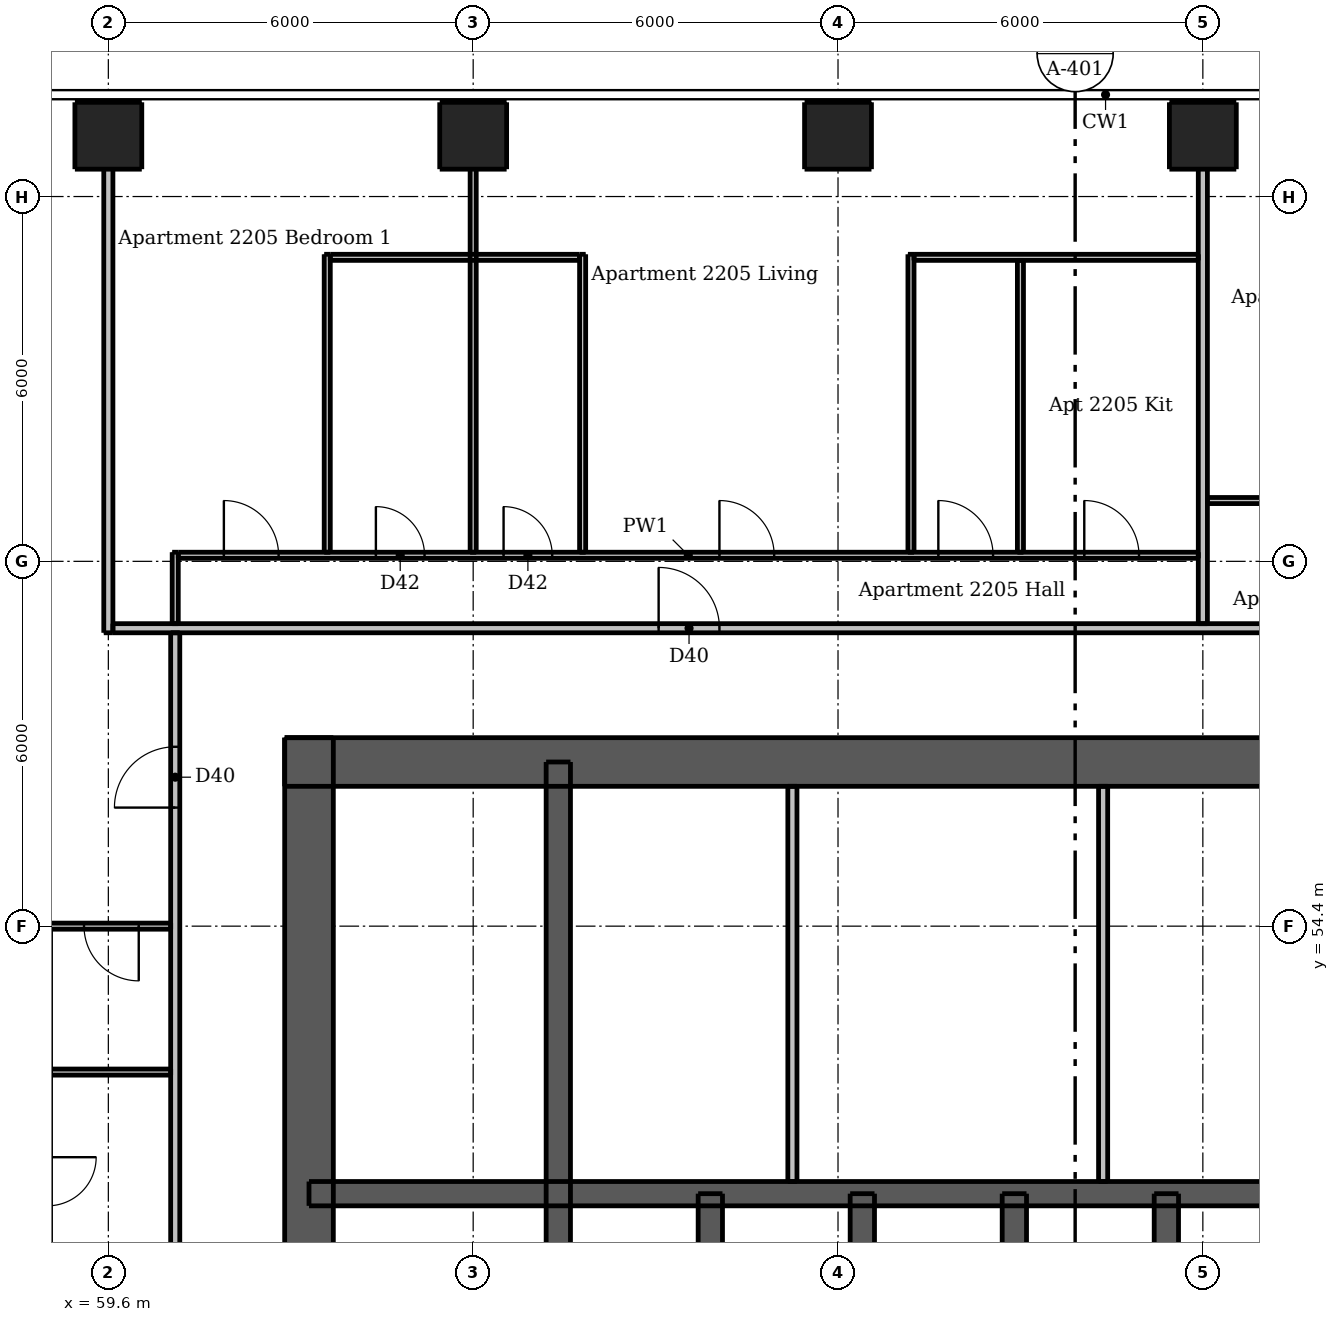
"""IFC4 building model, lengths in metres.
Left out: names, types, materials, properties, quantities, classifications, styles, units other than length and angle.
Written with IfcOpenShell. Run it as: python <this file> out.ifc"""

import sys

from ifc_helpers import new_model, si_unit, direction, frame, frame_2d, origin, origin_2d, place, context, subcontext, project, spatial, rectangle, extrude, element, fill, save


model = new_model("IFC4")
c1 = context("Model", 3, precision=1e-05, world=origin(), true_north=direction((0.0, 1.0)))
c2 = subcontext(c1, "Body", "Model", "MODEL_VIEW")
j1 = project(units=[si_unit("LENGTHUNIT", "METRE"), si_unit("PLANEANGLEUNIT", "RADIAN")], contexts=[c1])
p1 = place(None, origin())
s1 = spatial("IfcSite", under=j1, at=p1, CompositionType="ELEMENT")
p2 = place(p1, origin())
s2 = spatial("IfcBuilding", under=s1, at=p2, CompositionType="ELEMENT")
p3 = place(p2, frame((0.0, 0.0, 85.3)))
s3 = spatial("IfcBuildingStorey", under=s2, at=p3, CompositionType="ELEMENT", Elevation=85.3)
p4 = place(p3, frame((62.5, 57.1, 0.0), z_axis=(0.0, 0.0, 1.0), x_axis=(1.0, 0.0, 0.0)))
e1 = element("IfcWall", 1, at=p4, inside=s3, PredefinedType="SHEAR", context=c2, shape_type="SweptSolid", body=[
    extrude(rectangle(XDim=24.0, YDim=0.8, at=frame_2d((12.0, 0.0))), origin(), (0.0, 0.0, 1.0), 3.05),
])
p5 = place(p4, frame((20.9, 0.0, 0.0)))
e2 = element("IfcOpeningElement", 2, at=p5, cuts=e1, PredefinedType="OPENING", context=c2, shape_type="SweptSolid", body=[
    extrude(rectangle(XDim=1.1, YDim=2.1, at=frame_2d((0.55, 1.05))), frame((0.0, 0.41, 0.0), z_axis=(0.0, -1.0, 0.0), x_axis=(1.0, 0.0, 0.0)), (0.0, 0.0, 1.0), 0.82),
])
p6 = place(p4, frame((2.0, 0.0, 0.0)))
e3 = element("IfcOpeningElement", 3, at=p6, cuts=e1, PredefinedType="OPENING", context=c2, shape_type="SweptSolid", body=[
    extrude(rectangle(XDim=1.1, YDim=2.1, at=frame_2d((0.55, 1.05))), frame((0.0, 0.41, 0.0), z_axis=(0.0, -1.0, 0.0), x_axis=(1.0, 0.0, 0.0)), (0.0, 0.0, 1.0), 0.82),
])
p7 = place(p4, frame((6.075, 0.0, 0.0)))
e4 = element("IfcOpeningElement", 4, at=p7, cuts=e1, PredefinedType="OPENING", context=c2, shape_type="SweptSolid", body=[
    extrude(rectangle(XDim=0.9, YDim=2.1, at=frame_2d((0.45, 1.05))), frame((0.0, 0.41, 0.0), z_axis=(0.0, -1.0, 0.0), x_axis=(1.0, 0.0, 0.0)), (0.0, 0.0, 1.0), 0.82),
])
p8 = place(p4, frame((10.455, 0.0, 0.0)))
e5 = element("IfcOpeningElement", 5, at=p8, cuts=e1, PredefinedType="OPENING", context=c2, shape_type="SweptSolid", body=[
    extrude(rectangle(XDim=0.9, YDim=2.1, at=frame_2d((0.45, 1.05))), frame((0.0, 0.41, 0.0), z_axis=(0.0, -1.0, 0.0), x_axis=(1.0, 0.0, 0.0)), (0.0, 0.0, 1.0), 0.82),
])
p9 = place(p4, frame((15.93, 0.0, 0.0)))
e6 = element("IfcOpeningElement", 6, at=p9, cuts=e1, PredefinedType="OPENING", context=c2, shape_type="SweptSolid", body=[
    extrude(rectangle(XDim=0.9, YDim=2.1, at=frame_2d((0.45, 1.05))), frame((0.0, 0.41, 0.0), z_axis=(0.0, -1.0, 0.0), x_axis=(1.0, 0.0, 0.0)), (0.0, 0.0, 1.0), 0.82),
])
p10 = place(p3, frame((62.9, 33.5, 0.0), z_axis=(0.0, 0.0, 1.0), x_axis=(0.0, 1.0, 0.0)))
e7 = element("IfcWall", 7, at=p10, inside=s3, PredefinedType="SHEAR", context=c2, shape_type="SweptSolid", body=[
    extrude(rectangle(XDim=24.0, YDim=0.8, at=frame_2d((12.0, 0.0))), origin(), (0.0, 0.0, 1.0), 3.05),
])
p11 = place(p10, frame((11.2, 0.0, 0.0)))
e8 = element("IfcOpeningElement", 8, at=p11, cuts=e7, PredefinedType="OPENING", context=c2, shape_type="SweptSolid", body=[
    extrude(rectangle(XDim=1.6, YDim=2.1, at=frame_2d((0.8, 1.05))), frame((0.0, 0.41, 0.0), z_axis=(0.0, -1.0, 0.0), x_axis=(1.0, 0.0, 0.0)), (0.0, 0.0, 1.0), 0.82),
])
p12 = place(p3, frame((62.9, 50.0, 0.0), z_axis=(0.0, 0.0, 1.0), x_axis=(1.0, 0.0, 0.0)))
e9 = element("IfcWall", 9, at=p12, inside=s3, PredefinedType="SHEAR", context=c2, shape_type="SweptSolid", body=[
    extrude(rectangle(XDim=23.2, YDim=0.4, at=frame_2d((11.6, 0.0))), origin(), (0.0, 0.0, 1.0), 3.05),
])
p13 = place(p3, frame((67.0, 47.1, 0.0), z_axis=(0.0, 0.0, 1.0), x_axis=(0.0, 1.0, 0.0)))
e10 = element("IfcWall", 10, at=p13, inside=s3, PredefinedType="SHEAR", context=c2, shape_type="SweptSolid", body=[
    extrude(rectangle(XDim=10.0, YDim=0.4, at=frame_2d((5.0, 0.0))), origin(), (0.0, 0.0, 1.0), 3.05),
])
for number, where, z_axis, x_axis in (
    (11, (69.5, 47.1, 0.0), (0.0, 0.0, 1.0), (0.0, 1.0, 0.0)),
    (12, (72.0, 47.1, 0.0), (0.0, 0.0, 1.0), (0.0, 1.0, 0.0)),
    (13, (74.5, 47.1, 0.0), (0.0, 0.0, 1.0), (0.0, 1.0, 0.0)),
    (14, (77.0, 47.1, 0.0), (0.0, 0.0, 1.0), (0.0, 1.0, 0.0)),
):
    element("IfcWall", number, at=place(p3, frame(where, z_axis=z_axis, x_axis=x_axis)), inside=s3, PredefinedType="SHEAR", context=c2, shape_type="SweptSolid", body=[
        extrude(rectangle(XDim=2.9, YDim=0.4, at=frame_2d((1.45, 0.0))), origin(), (0.0, 0.0, 1.0), 3.05),
    ])
for number, where, z_axis, x_axis in (
    (15, (59.6, 67.4, 0.0), (0.0, 0.0, 1.0), (1.0, 0.0, 0.0)),
    (16, (65.6, 67.4, 0.0), (0.0, 0.0, 1.0), (1.0, 0.0, 0.0)),
    (17, (71.6, 67.4, 0.0), (0.0, 0.0, 1.0), (1.0, 0.0, 0.0)),
    (18, (77.6, 67.4, 0.0), (0.0, 0.0, 1.0), (1.0, 0.0, 0.0)),
):
    element("IfcColumn", number, at=place(p3, frame(where, z_axis=z_axis, x_axis=x_axis)), inside=s3, PredefinedType="COLUMN", context=c2, shape_type="SweptSolid", body=[
        extrude(rectangle(XDim=1.1, YDim=1.1, at=origin_2d()), origin(), (0.0, 0.0, 1.0), 3.05),
    ])
for number, where, z_axis, x_axis in (
    (19, (70.85, 50.2, 0.0), (0.0, 0.0, 1.0), (0.0, 1.0, 0.0)),
    (20, (75.96, 50.2, 0.0), (0.0, 0.0, 1.0), (0.0, 1.0, 0.0)),
):
    element("IfcWall", number, at=place(p3, frame(where, z_axis=z_axis, x_axis=x_axis)), inside=s3, PredefinedType="PLUMBINGWALL", context=c2, shape_type="SweptSolid", body=[
        extrude(rectangle(XDim=6.5, YDim=0.15, at=frame_2d((3.25, 0.0))), origin(), (0.0, 0.0, 1.0), 3.05),
    ])
p14 = place(p3, frame((60.7, 59.375, 0.0), z_axis=(0.0, 0.0, 1.0), x_axis=(0.0, 1.0, 0.0)))
e21 = element("IfcWall", 21, at=p14, inside=s3, PredefinedType="PARTITIONING", context=c2, shape_type="SweptSolid", body=[
    extrude(rectangle(XDim=1.175, YDim=0.1, at=frame_2d((0.587, 0.0))), origin(), (0.0, 0.0, 1.0), 3.05),
])
p15 = place(p3, frame((63.2, 60.55, 0.0), z_axis=(0.0, 0.0, 1.0), x_axis=(0.0, 1.0, 0.0)))
e22 = element("IfcWall", 22, at=p15, inside=s3, PredefinedType="PARTITIONING", context=c2, shape_type="SweptSolid", body=[
    extrude(rectangle(XDim=4.9, YDim=0.1, at=frame_2d((2.45, 0.0))), origin(), (0.0, 0.0, 1.0), 3.05),
])
p16 = place(p3, frame((65.6, 60.55, 0.0), z_axis=(0.0, 0.0, 1.0), x_axis=(0.0, 1.0, 0.0)))
e23 = element("IfcWall", 23, at=p16, inside=s3, PredefinedType="PARTITIONING", context=c2, shape_type="SweptSolid", body=[
    extrude(rectangle(XDim=7.45, YDim=0.1, at=frame_2d((3.725, 0.0))), origin(), (0.0, 0.0, 1.0), 2.516),
])
for number, where, z_axis, x_axis in (
    (24, (67.4, 60.55, 0.0), (0.0, 0.0, 1.0), (0.0, 1.0, 0.0)),
    (25, (72.8, 60.55, 0.0), (0.0, 0.0, 1.0), (0.0, 1.0, 0.0)),
):
    element("IfcWall", number, at=place(p3, frame(where, z_axis=z_axis, x_axis=x_axis)), inside=s3, PredefinedType="PARTITIONING", context=c2, shape_type="SweptSolid", body=[
        extrude(rectangle(XDim=4.9, YDim=0.1, at=frame_2d((2.45, 0.0))), origin(), (0.0, 0.0, 1.0), 3.05),
    ])
p17 = place(p3, frame((74.6, 60.55, 0.0), z_axis=(0.0, 0.0, 1.0), x_axis=(0.0, 1.0, 0.0)))
e26 = element("IfcWall", 26, at=p17, inside=s3, PredefinedType="PARTITIONING", context=c2, shape_type="SweptSolid", body=[
    extrude(rectangle(XDim=4.8, YDim=0.1, at=frame_2d((2.4, 0.0))), origin(), (0.0, 0.0, 1.0), 3.05),
])
p18 = place(p3, frame((63.25, 65.4, 0.0), z_axis=(0.0, 0.0, 1.0), x_axis=(1.0, 0.0, 0.0)))
e27 = element("IfcWall", 27, at=p18, inside=s3, PredefinedType="PARTITIONING", context=c2, shape_type="SweptSolid", body=[
    extrude(rectangle(XDim=4.1, YDim=0.1, at=frame_2d((2.05, 0.0))), origin(), (0.0, 0.0, 1.0), 3.05),
])
p19 = place(p3, frame((72.85, 65.4, 0.0), z_axis=(0.0, 0.0, 1.0), x_axis=(1.0, 0.0, 0.0)))
e28 = element("IfcWall", 28, at=p19, inside=s3, PredefinedType="PARTITIONING", context=c2, shape_type="SweptSolid", body=[
    extrude(rectangle(XDim=4.675, YDim=0.1, at=frame_2d((2.337, 0.0))), origin(), (0.0, 0.0, 1.0), 3.05),
])
p20 = place(p3, frame((83.55, 61.4, 0.0), z_axis=(0.0, 0.0, 1.0), x_axis=(-1.0, 0.0, 0.0)))
e29 = element("IfcWall", 29, at=p20, inside=s3, PredefinedType="PARTITIONING", context=c2, shape_type="SweptSolid", body=[
    extrude(rectangle(XDim=5.875, YDim=0.1, at=frame_2d((2.938, 0.0))), origin(), (0.0, 0.0, 1.0), 3.05),
])
p21 = place(p20, frame((3.75, 0.0, 0.0)))
e30 = element("IfcOpeningElement", 30, at=p21, cuts=e29, PredefinedType="OPENING", context=c2, shape_type="SweptSolid", body=[
    extrude(rectangle(XDim=0.8, YDim=2.1, at=frame_2d((0.4, 1.05))), frame((0.0, 0.06, 0.0), z_axis=(0.0, -1.0, 0.0), x_axis=(1.0, 0.0, 0.0)), (0.0, 0.0, 1.0), 0.12),
])
p22 = place(p3, frame((60.75, 60.5, 0.0), z_axis=(0.0, 0.0, 1.0), x_axis=(1.0, 0.0, 0.0)))
e31 = element("IfcWall", 31, at=p22, inside=s3, PredefinedType="PARTITIONING", context=c2, shape_type="SweptSolid", body=[
    extrude(rectangle(XDim=16.775, YDim=0.1, at=frame_2d((8.387, 0.0))), origin(), (0.0, 0.0, 1.0), 3.05),
])
p23 = place(p22, frame((8.9, 0.0, 0.0)))
e32 = element("IfcOpeningElement", 32, at=p23, cuts=e31, PredefinedType="OPENING", context=c2, shape_type="SweptSolid", body=[
    extrude(rectangle(XDim=0.9, YDim=2.1, at=frame_2d((0.45, 1.05))), frame((0.0, 0.06, 0.0), z_axis=(0.0, -1.0, 0.0), x_axis=(1.0, 0.0, 0.0)), (0.0, 0.0, 1.0), 0.12),
])
p24 = place(p22, frame((14.9, 0.0, 0.0)))
e33 = element("IfcOpeningElement", 33, at=p24, cuts=e31, PredefinedType="OPENING", context=c2, shape_type="SweptSolid", body=[
    extrude(rectangle(XDim=0.9, YDim=2.1, at=frame_2d((0.45, 1.05))), frame((0.0, 0.06, 0.0), z_axis=(0.0, -1.0, 0.0), x_axis=(1.0, 0.0, 0.0)), (0.0, 0.0, 1.0), 0.12),
])
p25 = place(p22, frame((12.5, 0.0, 0.0)))
e34 = element("IfcOpeningElement", 34, at=p25, cuts=e31, PredefinedType="OPENING", context=c2, shape_type="SweptSolid", body=[
    extrude(rectangle(XDim=0.9, YDim=2.1, at=frame_2d((0.45, 1.05))), frame((0.0, 0.06, 0.0), z_axis=(0.0, -1.0, 0.0), x_axis=(1.0, 0.0, 0.0)), (0.0, 0.0, 1.0), 0.12),
])
p26 = place(p22, frame((5.35, 0.0, 0.0)))
e35 = element("IfcOpeningElement", 35, at=p26, cuts=e31, PredefinedType="OPENING", context=c2, shape_type="SweptSolid", body=[
    extrude(rectangle(XDim=0.8, YDim=2.1, at=frame_2d((0.4, 1.05))), frame((0.0, 0.06, 0.0), z_axis=(0.0, -1.0, 0.0), x_axis=(1.0, 0.0, 0.0)), (0.0, 0.0, 1.0), 0.12),
])
p27 = place(p22, frame((0.75, 0.0, 0.0)))
e36 = element("IfcOpeningElement", 36, at=p27, cuts=e31, PredefinedType="OPENING", context=c2, shape_type="SweptSolid", body=[
    extrude(rectangle(XDim=0.9, YDim=2.1, at=frame_2d((0.45, 1.05))), frame((0.0, 0.06, 0.0), z_axis=(0.0, -1.0, 0.0), x_axis=(1.0, 0.0, 0.0)), (0.0, 0.0, 1.0), 0.12),
])
p28 = place(p22, frame((3.25, 0.0, 0.0)))
e37 = element("IfcOpeningElement", 37, at=p28, cuts=e31, PredefinedType="OPENING", context=c2, shape_type="SweptSolid", body=[
    extrude(rectangle(XDim=0.8, YDim=2.1, at=frame_2d((0.4, 1.05))), frame((0.0, 0.06, 0.0), z_axis=(0.0, -1.0, 0.0), x_axis=(1.0, 0.0, 0.0)), (0.0, 0.0, 1.0), 0.12),
])
p29 = place(p3, frame((60.625, 54.4, 0.0), z_axis=(0.0, 0.0, 1.0), x_axis=(-1.0, 0.0, 0.0)))
e38 = element("IfcWall", 38, at=p29, inside=s3, PredefinedType="PARTITIONING", context=c2, shape_type="SweptSolid", body=[
    extrude(rectangle(XDim=8.625, YDim=0.1, at=frame_2d((4.312, 0.0))), origin(), (0.0, 0.0, 1.0), 2.516),
])
p30 = place(p29, frame((0.525, 0.0, 0.0)))
e39 = element("IfcOpeningElement", 39, at=p30, cuts=e38, PredefinedType="OPENING", context=c2, shape_type="SweptSolid", body=[
    extrude(rectangle(XDim=0.9, YDim=2.1, at=frame_2d((0.45, 1.05))), frame((0.0, 0.06, 0.0), z_axis=(0.0, -1.0, 0.0), x_axis=(1.0, 0.0, 0.0)), (0.0, 0.0, 1.0), 0.12),
])
p31 = place(p29, frame((4.875, 0.0, 0.0)))
e40 = element("IfcOpeningElement", 40, at=p31, cuts=e38, PredefinedType="OPENING", context=c2, shape_type="SweptSolid", body=[
    extrude(rectangle(XDim=0.9, YDim=2.1, at=frame_2d((0.45, 1.05))), frame((0.0, 0.06, 0.0), z_axis=(0.0, -1.0, 0.0), x_axis=(1.0, 0.0, 0.0)), (0.0, 0.0, 1.0), 0.12),
])
p32 = place(p3, frame((58.65, 52.0, 0.0), z_axis=(0.0, 0.0, 1.0), x_axis=(1.0, 0.0, 0.0)))
e41 = element("IfcWall", 41, at=p32, inside=s3, PredefinedType="PARTITIONING", context=c2, shape_type="SweptSolid", body=[
    extrude(rectangle(XDim=1.975, YDim=0.1, at=frame_2d((0.988, 0.0))), origin(), (0.0, 0.0, 1.0), 3.05),
])
p33 = place(p3, frame((59.6, 59.225, 0.0), z_axis=(0.0, 0.0, 1.0), x_axis=(0.0, 1.0, 0.0)))
e42 = element("IfcWall", 42, at=p33, inside=s3, PredefinedType="PARTITIONING", context=c2, shape_type="SweptSolid", body=[
    extrude(rectangle(XDim=8.775, YDim=0.15, at=frame_2d((4.387, 0.0))), origin(), (0.0, 0.0, 1.0), 2.51),
])
p34 = place(p3, frame((60.7, 30.325, 0.0), z_axis=(0.0, 0.0, 1.0), x_axis=(0.0, 1.0, 0.0)))
e43 = element("IfcWall", 43, at=p34, inside=s3, PredefinedType="PARTITIONING", context=c2, shape_type="SweptSolid", body=[
    extrude(rectangle(XDim=28.9, YDim=0.15, at=frame_2d((14.45, 0.0))), origin(), (0.0, 0.0, 1.0), 3.05),
])
p35 = place(p34, frame((9.225, 0.0, 0.0)))
e44 = element("IfcOpeningElement", 44, at=p35, cuts=e43, PredefinedType="OPENING", context=c2, shape_type="SweptSolid", body=[
    extrude(rectangle(XDim=1.0, YDim=2.1, at=frame_2d((0.5, 1.05))), frame((0.0, 0.085, 0.0), z_axis=(0.0, -1.0, 0.0), x_axis=(1.0, 0.0, 0.0)), (0.0, 0.0, 1.0), 0.17),
])
p36 = place(p34, frame((26.025, 0.0, 0.0)))
e45 = element("IfcOpeningElement", 45, at=p36, cuts=e43, PredefinedType="OPENING", context=c2, shape_type="SweptSolid", body=[
    extrude(rectangle(XDim=1.0, YDim=2.1, at=frame_2d((0.5, 1.05))), frame((0.0, 0.085, 0.0), z_axis=(0.0, -1.0, 0.0), x_axis=(1.0, 0.0, 0.0)), (0.0, 0.0, 1.0), 0.17),
])
p37 = place(p3, frame((77.6, 59.375, 0.0), z_axis=(0.0, 0.0, 1.0), x_axis=(0.0, 1.0, 0.0)))
e46 = element("IfcWall", 46, at=p37, inside=s3, PredefinedType="PARTITIONING", context=c2, shape_type="SweptSolid", body=[
    extrude(rectangle(XDim=8.625, YDim=0.15, at=frame_2d((4.312, 0.0))), origin(), (0.0, 0.0, 1.0), 2.516),
])
p38 = place(p3, frame((59.675, 59.3, 0.0), z_axis=(0.0, 0.0, 1.0), x_axis=(1.0, 0.0, 0.0)))
e47 = element("IfcWall", 47, at=p38, inside=s3, PredefinedType="PARTITIONING", context=c2, shape_type="SweptSolid", body=[
    extrude(rectangle(XDim=28.55, YDim=0.15, at=frame_2d((14.275, 0.0))), origin(), (0.0, 0.0, 1.0), 3.05),
])
p39 = place(p38, frame((8.975, 0.0, 0.0)))
e48 = element("IfcOpeningElement", 48, at=p39, cuts=e47, PredefinedType="OPENING", context=c2, shape_type="SweptSolid", body=[
    extrude(rectangle(XDim=1.0, YDim=2.1, at=frame_2d((0.5, 1.05))), frame((0.0, 0.085, 0.0), z_axis=(0.0, -1.0, 0.0), x_axis=(1.0, 0.0, 0.0)), (0.0, 0.0, 1.0), 0.17),
])
p40 = place(p38, frame((25.775, 0.0, 0.0)))
e49 = element("IfcOpeningElement", 49, at=p40, cuts=e47, PredefinedType="OPENING", context=c2, shape_type="SweptSolid", body=[
    extrude(rectangle(XDim=1.0, YDim=2.1, at=frame_2d((0.5, 1.05))), frame((0.0, 0.085, 0.0), z_axis=(0.0, -1.0, 0.0), x_axis=(1.0, 0.0, 0.0)), (0.0, 0.0, 1.0), 0.17),
])
p41 = place(p6, origin())
e50 = element("IfcDoor", 50, at=p41, inside=s3, OperationType="SINGLE_SWING_LEFT", PredefinedType="DOOR", context=c2, shape_type="SweptSolid", body=[
    extrude(rectangle(XDim=1.1, YDim=2.1, at=frame_2d((0.55, 1.05))), frame((0.0, -0.337, 0.0), z_axis=(0.0, -1.0, 0.0), x_axis=(1.0, 0.0, 0.0)), (0.0, 0.0, 1.0), 0.05),
])
fill(e3, e50)
p42 = place(p7, origin())
e51 = element("IfcDoor", 51, at=p42, inside=s3, OperationType="SINGLE_SWING_RIGHT", PredefinedType="DOOR", context=c2, shape_type="SweptSolid", body=[
    extrude(rectangle(XDim=0.9, YDim=2.1, at=frame_2d((0.45, 1.05))), frame((0.0, -0.337, 0.0), z_axis=(0.0, -1.0, 0.0), x_axis=(1.0, 0.0, 0.0)), (0.0, 0.0, 1.0), 0.05),
])
fill(e4, e51)
p43 = place(p8, origin())
e52 = element("IfcDoor", 52, at=p43, inside=s3, OperationType="SINGLE_SWING_RIGHT", PredefinedType="DOOR", context=c2, shape_type="SweptSolid", body=[
    extrude(rectangle(XDim=0.9, YDim=2.1, at=frame_2d((0.45, 1.05))), frame((0.0, -0.337, 0.0), z_axis=(0.0, -1.0, 0.0), x_axis=(1.0, 0.0, 0.0)), (0.0, 0.0, 1.0), 0.05),
])
fill(e5, e52)
p44 = place(p9, origin())
e53 = element("IfcDoor", 53, at=p44, inside=s3, OperationType="SINGLE_SWING_RIGHT", PredefinedType="DOOR", context=c2, shape_type="SweptSolid", body=[
    extrude(rectangle(XDim=0.9, YDim=2.1, at=frame_2d((0.45, 1.05))), frame((0.0, -0.337, 0.0), z_axis=(0.0, -1.0, 0.0), x_axis=(1.0, 0.0, 0.0)), (0.0, 0.0, 1.0), 0.05),
])
fill(e6, e53)
p45 = place(p39, origin())
e54 = element("IfcDoor", 54, at=p45, inside=s3, OperationType="SINGLE_SWING_LEFT", PredefinedType="DOOR", context=c2, shape_type="SweptSolid", body=[
    extrude(rectangle(XDim=1.0, YDim=2.1, at=frame_2d((0.5, 1.05))), frame((0.0, 0.025, 0.0), z_axis=(0.0, -1.0, 0.0), x_axis=(1.0, 0.0, 0.0)), (0.0, 0.0, 1.0), 0.05),
])
fill(e48, e54)
p46 = place(p23, origin())
e55 = element("IfcDoor", 55, at=p46, inside=s3, OperationType="SINGLE_SWING_LEFT", PredefinedType="DOOR", context=c2, shape_type="SweptSolid", body=[
    extrude(rectangle(XDim=0.9, YDim=2.1, at=frame_2d((0.45, 1.05))), frame((0.0, 0.025, 0.0), z_axis=(0.0, -1.0, 0.0), x_axis=(1.0, 0.0, 0.0)), (0.0, 0.0, 1.0), 0.05),
])
fill(e32, e55)
p47 = place(p24, origin())
e56 = element("IfcDoor", 56, at=p47, inside=s3, OperationType="SINGLE_SWING_LEFT", PredefinedType="DOOR", context=c2, shape_type="SweptSolid", body=[
    extrude(rectangle(XDim=0.9, YDim=2.1, at=frame_2d((0.45, 1.05))), frame((0.0, 0.025, 0.0), z_axis=(0.0, -1.0, 0.0), x_axis=(1.0, 0.0, 0.0)), (0.0, 0.0, 1.0), 0.05),
])
fill(e33, e56)
p48 = place(p25, origin())
e57 = element("IfcDoor", 57, at=p48, inside=s3, OperationType="SINGLE_SWING_LEFT", PredefinedType="DOOR", context=c2, shape_type="SweptSolid", body=[
    extrude(rectangle(XDim=0.9, YDim=2.1, at=frame_2d((0.45, 1.05))), frame((0.0, 0.025, 0.0), z_axis=(0.0, -1.0, 0.0), x_axis=(1.0, 0.0, 0.0)), (0.0, 0.0, 1.0), 0.05),
])
fill(e34, e57)
p49 = place(p26, origin())
e58 = element("IfcDoor", 58, at=p49, inside=s3, OperationType="SINGLE_SWING_LEFT", PredefinedType="DOOR", context=c2, shape_type="SweptSolid", body=[
    extrude(rectangle(XDim=0.8, YDim=2.1, at=frame_2d((0.4, 1.05))), frame((0.0, 0.025, 0.0), z_axis=(0.0, -1.0, 0.0), x_axis=(1.0, 0.0, 0.0)), (0.0, 0.0, 1.0), 0.05),
])
fill(e35, e58)
p50 = place(p27, origin())
e59 = element("IfcDoor", 59, at=p50, inside=s3, OperationType="SINGLE_SWING_LEFT", PredefinedType="DOOR", context=c2, shape_type="SweptSolid", body=[
    extrude(rectangle(XDim=0.9, YDim=2.1, at=frame_2d((0.45, 1.05))), frame((0.0, 0.025, 0.0), z_axis=(0.0, -1.0, 0.0), x_axis=(1.0, 0.0, 0.0)), (0.0, 0.0, 1.0), 0.05),
])
fill(e36, e59)
p51 = place(p28, origin())
e60 = element("IfcDoor", 60, at=p51, inside=s3, OperationType="SINGLE_SWING_LEFT", PredefinedType="DOOR", context=c2, shape_type="SweptSolid", body=[
    extrude(rectangle(XDim=0.8, YDim=2.1, at=frame_2d((0.4, 1.05))), frame((0.0, 0.025, 0.0), z_axis=(0.0, -1.0, 0.0), x_axis=(1.0, 0.0, 0.0)), (0.0, 0.0, 1.0), 0.05),
])
fill(e37, e60)
p52 = place(p36, origin())
e61 = element("IfcDoor", 61, at=p52, inside=s3, OperationType="SINGLE_SWING_LEFT", PredefinedType="DOOR", context=c2, shape_type="SweptSolid", body=[
    extrude(rectangle(XDim=1.0, YDim=2.1, at=frame_2d((0.5, 1.05))), frame((0.0, 0.025, 0.0), z_axis=(0.0, -1.0, 0.0), x_axis=(1.0, 0.0, 0.0)), (0.0, 0.0, 1.0), 0.05),
])
fill(e45, e61)
p53 = place(p30, origin())
e62 = element("IfcDoor", 62, at=p53, inside=s3, OperationType="SINGLE_SWING_LEFT", PredefinedType="DOOR", context=c2, shape_type="SweptSolid", body=[
    extrude(rectangle(XDim=0.9, YDim=2.1, at=frame_2d((0.45, 1.05))), frame((0.0, 0.025, 0.0), z_axis=(0.0, -1.0, 0.0), x_axis=(1.0, 0.0, 0.0)), (0.0, 0.0, 1.0), 0.05),
])
fill(e39, e62)
save(model, sys.argv[1])
